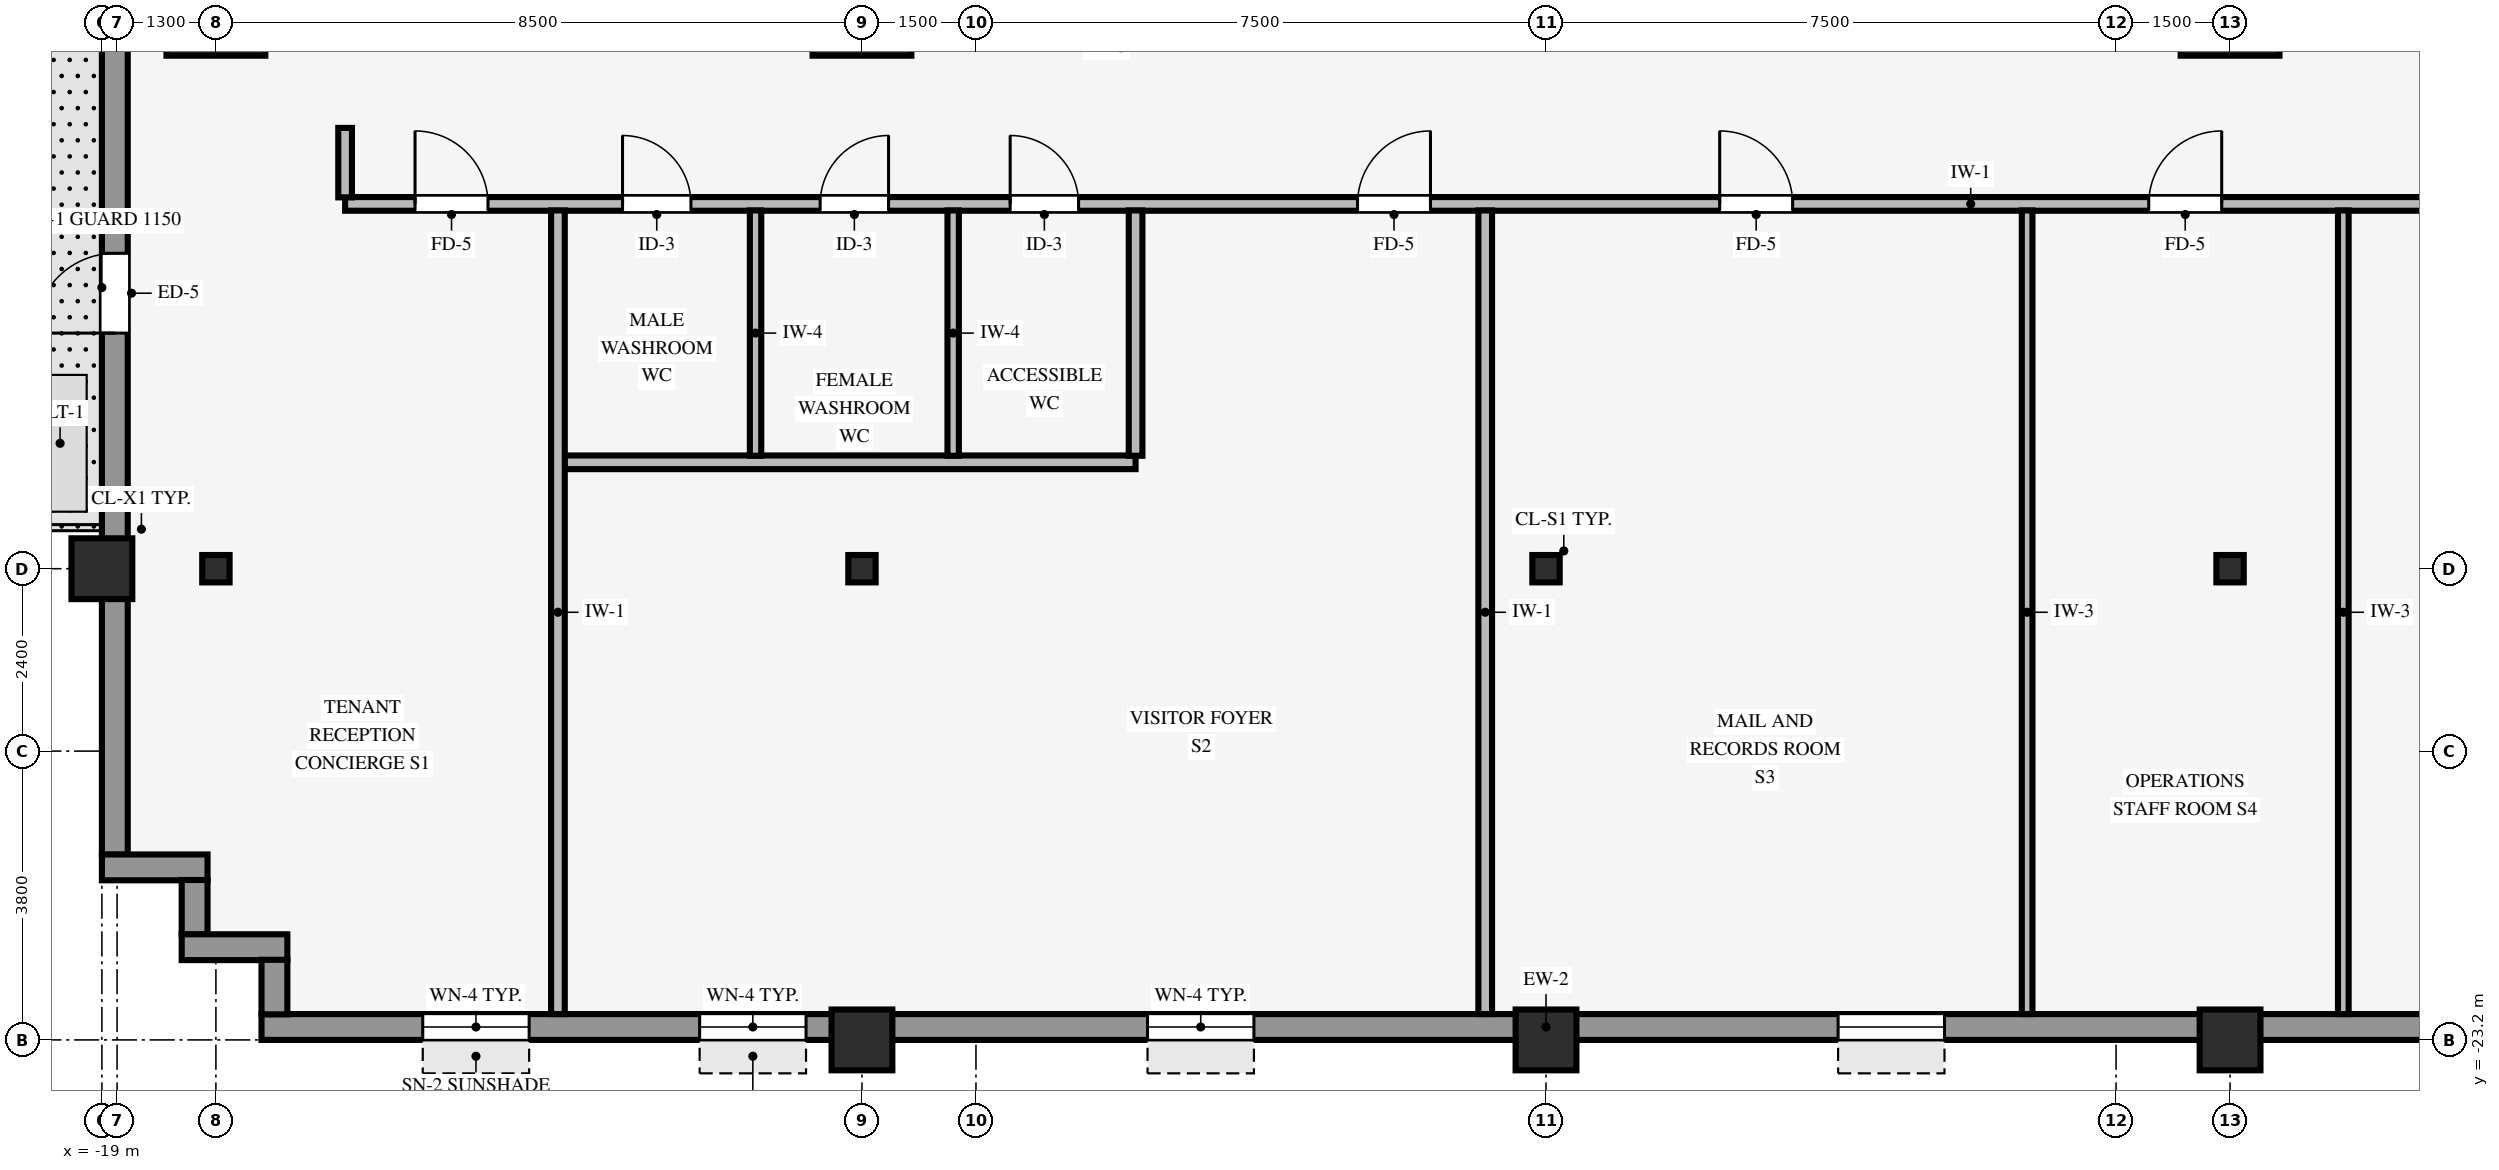
"""IFC4 building model, lengths in metres.
Left out: names, types, materials, properties, quantities, classifications, styles, units other than length and angle.
Written with IfcOpenShell. Run it as: python <this file> out.ifc"""

import sys

from ifc_helpers import new_model, si_unit, direction, frame, frame_2d, origin, origin_2d, place, context, subcontext, project, spatial, rectangle, hollow_rectangle, i_section, extrude, source, transform, mapped, element, fill, save


model = new_model("IFC4")
c1 = context("Model", 3, precision=1e-05, world=origin(), true_north=direction((0.0, 1.0)))
c2 = subcontext(c1, "Body", "Model", "MODEL_VIEW")
j1 = project(units=[si_unit("LENGTHUNIT", "METRE"), si_unit("PLANEANGLEUNIT", "RADIAN")], contexts=[c1])
p1 = place(None, origin())
s1 = spatial("IfcSite", under=j1, at=p1, CompositionType="ELEMENT")
p2 = place(p1, origin())
s2 = spatial("IfcBuilding", under=s1, at=p2, CompositionType="ELEMENT")
p3 = place(p2, frame((0.0, 0.0, 49.5)))
s3 = spatial("IfcBuildingStorey", under=s2, at=p3, CompositionType="ELEMENT", Elevation=49.5)
for number, where, z_axis, x_axis in (
    (1, (-17.5, -9.6, 0.0), (0.0, 0.0, 1.0), (1.0, 0.0, 0.0)),
    (2, (-9.0, -9.6, 0.0), (0.0, 0.0, 1.0), (1.0, 0.0, 0.0)),
    (3, (9.0, -9.6, 0.0), (0.0, 0.0, 1.0), (1.0, 0.0, 0.0)),
):
    element("IfcColumn", number, at=place(p3, frame(where, z_axis=z_axis, x_axis=x_axis)), inside=s3, PredefinedType="COLUMN", context=c2, shape_type="SweptSolid", body=[
        extrude(rectangle(XDim=1.3, YDim=1.3, at=origin_2d()), origin(), (0.0, 0.0, 1.0), 3.37),
    ])
for number, where, z_axis, x_axis in (
    (4, (-19.0, -17.0, 0.0), (0.0, 0.0, 1.0), (1.0, 0.0, 0.0)),
    (5, (-9.0, -23.2, 0.0), (0.0, 0.0, 1.0), (1.0, 0.0, 0.0)),
    (6, (0.0, -23.2, 0.0), (0.0, 0.0, 1.0), (1.0, 0.0, 0.0)),
    (7, (9.0, -23.2, 0.0), (0.0, 0.0, 1.0), (1.0, 0.0, 0.0)),
):
    element("IfcColumn", number, at=place(p3, frame(where, z_axis=z_axis, x_axis=x_axis)), inside=s3, PredefinedType="COLUMN", context=c2, shape_type="SweptSolid", body=[
        extrude(hollow_rectangle(XDim=0.8, YDim=0.8, WallThickness=0.055, InnerFilletRadius=0.055, OuterFilletRadius=0.11, at=origin_2d()), origin(), (0.0, 0.0, 1.0), 3.37),
    ])
for number, where, z_axis, x_axis in (
    (8, (0.0, -17.0, 0.0), (0.0, 0.0, 1.0), (1.0, 0.0, 0.0)),
    (9, (-17.5, -17.0, 0.0), (0.0, 0.0, 1.0), (1.0, 0.0, 0.0)),
    (10, (-9.0, -17.0, 0.0), (0.0, 0.0, 1.0), (1.0, 0.0, 0.0)),
    (11, (9.0, -17.0, 0.0), (0.0, 0.0, 1.0), (1.0, 0.0, 0.0)),
):
    element("IfcColumn", number, at=place(p3, frame(where, z_axis=z_axis, x_axis=x_axis)), inside=s3, PredefinedType="COLUMN", context=c2, shape_type="SweptSolid", body=[
        extrude(i_section(OverallWidth=0.36, OverallDepth=0.36, WebThickness=0.021, FlangeThickness=0.021, FilletRadius=0.018, at=origin_2d()), origin(), (0.0, 0.0, 1.0), 3.37),
    ])
p4 = place(p3, frame((-16.9, -23.03, 0.0), z_axis=(0.0, 0.0, 1.0), x_axis=(1.0, 0.0, 0.0)))
e12 = element("IfcWall", 12, at=p4, inside=s3, PredefinedType="STANDARD", context=c2, shape_type="SweptSolid", body=[
    extrude(rectangle(XDim=33.8, YDim=0.34, at=frame_2d((16.9, 0.0))), origin(), (0.0, 0.0, 1.0), 2.705),
])
p5 = place(p4, frame((2.121, 0.0, 0.8)))
e13 = element("IfcOpeningElement", 13, at=p5, cuts=e12, PredefinedType="OPENING", context=c2, shape_type="SweptSolid", body=[
    extrude(rectangle(XDim=1.4, YDim=1.65, at=frame_2d((0.7, 0.825))), frame((0.0, 0.18, 0.0), z_axis=(0.0, -1.0, 0.0), x_axis=(1.0, 0.0, 0.0)), (0.0, 0.0, 1.0), 0.36),
])
p6 = place(p4, frame((5.764, 0.0, 0.8)))
e14 = element("IfcOpeningElement", 14, at=p6, cuts=e12, PredefinedType="OPENING", context=c2, shape_type="SweptSolid", body=[
    extrude(rectangle(XDim=1.4, YDim=1.65, at=frame_2d((0.7, 0.825))), frame((0.0, 0.18, 0.0), z_axis=(0.0, -1.0, 0.0), x_axis=(1.0, 0.0, 0.0)), (0.0, 0.0, 1.0), 0.36),
])
p7 = place(p4, frame((11.657, 0.0, 0.8)))
e15 = element("IfcOpeningElement", 15, at=p7, cuts=e12, PredefinedType="OPENING", context=c2, shape_type="SweptSolid", body=[
    extrude(rectangle(XDim=1.4, YDim=1.65, at=frame_2d((0.7, 0.825))), frame((0.0, 0.18, 0.0), z_axis=(0.0, -1.0, 0.0), x_axis=(1.0, 0.0, 0.0)), (0.0, 0.0, 1.0), 0.36),
])
p8 = place(p4, frame((20.743, 0.0, 0.8)))
e16 = element("IfcOpeningElement", 16, at=p8, cuts=e12, PredefinedType="OPENING", context=c2, shape_type="SweptSolid", body=[
    extrude(rectangle(XDim=1.4, YDim=1.65, at=frame_2d((0.7, 0.825))), frame((0.0, 0.18, 0.0), z_axis=(0.0, -1.0, 0.0), x_axis=(1.0, 0.0, 0.0)), (0.0, 0.0, 1.0), 0.36),
])
p9 = place(p4, frame((29.829, 0.0, 0.8)))
e17 = element("IfcOpeningElement", 17, at=p9, cuts=e12, PredefinedType="OPENING", context=c2, shape_type="SweptSolid", body=[
    extrude(rectangle(XDim=1.4, YDim=1.65, at=frame_2d((0.7, 0.825))), frame((0.0, 0.18, 0.0), z_axis=(0.0, -1.0, 0.0), x_axis=(1.0, 0.0, 0.0)), (0.0, 0.0, 1.0), 0.36),
])
p10 = place(p3, frame((-18.83, -20.764, 0.0), z_axis=(0.0, 0.0, 1.0), x_axis=(0.0, 1.0, 0.0)))
e18 = element("IfcWall", 18, at=p10, inside=s3, PredefinedType="STANDARD", context=c2, shape_type="SweptSolid", body=[
    extrude(rectangle(XDim=41.528, YDim=0.34, at=frame_2d((20.764, 0.0))), origin(), (0.0, 0.0, 1.0), 2.705),
])
p11 = place(p10, frame((6.864, 0.0, 0.0)))
e19 = element("IfcOpeningElement", 19, at=p11, cuts=e18, PredefinedType="OPENING", context=c2, shape_type="SweptSolid", body=[
    extrude(rectangle(XDim=1.05, YDim=2.1, at=frame_2d((0.525, 1.05))), frame((0.0, 0.18, 0.0), z_axis=(0.0, -1.0, 0.0), x_axis=(1.0, 0.0, 0.0)), (0.0, 0.0, 1.0), 0.36),
])
p12 = place(p10, frame((32.467, 0.0, 0.8)))
e20 = element("IfcOpeningElement", 20, at=p12, cuts=e18, PredefinedType="OPENING", context=c2, shape_type="SweptSolid", body=[
    extrude(rectangle(XDim=2.2, YDim=1.65, at=frame_2d((1.1, 0.825))), frame((0.0, 0.18, 0.0), z_axis=(0.0, -1.0, 0.0), x_axis=(1.0, 0.0, 0.0)), (0.0, 0.0, 1.0), 0.36),
])
p13 = place(p3, frame((-19.0, -20.93, 0.0), z_axis=(0.0, 0.0, 1.0), x_axis=(1.0, 0.0, 0.0)))
e21 = element("IfcWall", 21, at=p13, inside=s3, PredefinedType="STANDARD", context=c2, shape_type="SweptSolid", body=[
    extrude(rectangle(XDim=1.39, YDim=0.34, at=frame_2d((0.695, 0.0))), origin(), (0.0, 0.0, 1.0), 3.36),
])
p14 = place(p3, frame((-17.78, -21.814, 0.0), z_axis=(0.0, 0.0, 1.0), x_axis=(0.0, 1.0, 0.0)))
e22 = element("IfcWall", 22, at=p14, inside=s3, PredefinedType="STANDARD", context=c2, shape_type="SweptSolid", body=[
    extrude(rectangle(XDim=0.718, YDim=0.34, at=frame_2d((0.359, 0.0))), origin(), (0.0, 0.0, 1.0), 3.36),
])
p15 = place(p3, frame((-17.95, -21.98, 0.0), z_axis=(0.0, 0.0, 1.0), x_axis=(1.0, 0.0, 0.0)))
e23 = element("IfcWall", 23, at=p15, inside=s3, PredefinedType="STANDARD", context=c2, shape_type="SweptSolid", body=[
    extrude(rectangle(XDim=1.39, YDim=0.34, at=frame_2d((0.695, 0.0))), origin(), (0.0, 0.0, 1.0), 3.36),
])
p16 = place(p3, frame((-16.73, -22.864, 0.0), z_axis=(0.0, 0.0, 1.0), x_axis=(0.0, 1.0, 0.0)))
e24 = element("IfcWall", 24, at=p16, inside=s3, PredefinedType="STANDARD", context=c2, shape_type="SweptSolid", body=[
    extrude(rectangle(XDim=0.718, YDim=0.34, at=frame_2d((0.359, 0.0))), origin(), (0.0, 0.0, 1.0), 3.36),
])
p17 = place(p3, frame((-12.914, -15.6, 0.0), z_axis=(0.0, 0.0, 1.0), x_axis=(1.0, 0.0, 0.0)))
e25 = element("IfcWall", 25, at=p17, inside=s3, PredefinedType="PARTITIONING", context=c2, shape_type="SweptSolid", body=[
    extrude(rectangle(XDim=7.514, YDim=0.18, at=frame_2d((3.757, 0.0))), origin(), (0.0, 0.0, 1.0), 3.36),
])
p18 = place(p3, frame((-15.8, -12.2, 0.0), z_axis=(0.0, 0.0, 1.0), x_axis=(1.0, 0.0, 0.0)))
e26 = element("IfcWall", 26, at=p18, inside=s3, PredefinedType="PARTITIONING", context=c2, shape_type="SweptSolid", body=[
    extrude(rectangle(XDim=31.6, YDim=0.18, at=frame_2d((15.8, 0.0))), origin(), (0.0, 0.0, 1.0), 3.36),
])
p19 = place(p18, frame((18.085, 0.0, 0.0)))
e27 = element("IfcOpeningElement", 27, at=p19, cuts=e26, PredefinedType="OPENING", context=c2, shape_type="SweptSolid", body=[
    extrude(rectangle(XDim=0.96, YDim=2.1, at=frame_2d((0.48, 1.05))), frame((0.0, 0.1, 0.0), z_axis=(0.0, -1.0, 0.0), x_axis=(1.0, 0.0, 0.0)), (0.0, 0.0, 1.0), 0.2),
])
p20 = place(p18, frame((27.985, 0.0, 0.0)))
e28 = element("IfcOpeningElement", 28, at=p20, cuts=e26, PredefinedType="OPENING", context=c2, shape_type="SweptSolid", body=[
    extrude(rectangle(XDim=0.96, YDim=2.1, at=frame_2d((0.48, 1.05))), frame((0.0, 0.1, 0.0), z_axis=(0.0, -1.0, 0.0), x_axis=(1.0, 0.0, 0.0)), (0.0, 0.0, 1.0), 0.2),
])
p21 = place(p18, frame((23.73, 0.0, 0.0)))
e29 = element("IfcOpeningElement", 29, at=p21, cuts=e26, PredefinedType="OPENING", context=c2, shape_type="SweptSolid", body=[
    extrude(rectangle(XDim=0.96, YDim=2.1, at=frame_2d((0.48, 1.05))), frame((0.0, 0.1, 0.0), z_axis=(0.0, -1.0, 0.0), x_axis=(1.0, 0.0, 0.0)), (0.0, 0.0, 1.0), 0.2),
])
p22 = place(p18, frame((0.92, 0.0, 0.0)))
e30 = element("IfcOpeningElement", 30, at=p22, cuts=e26, PredefinedType="OPENING", context=c2, shape_type="SweptSolid", body=[
    extrude(rectangle(XDim=0.96, YDim=2.1, at=frame_2d((0.48, 1.05))), frame((0.0, 0.1, 0.0), z_axis=(0.0, -1.0, 0.0), x_axis=(1.0, 0.0, 0.0)), (0.0, 0.0, 1.0), 0.2),
])
p23 = place(p18, frame((6.25, 0.0, 0.0)))
e31 = element("IfcOpeningElement", 31, at=p23, cuts=e26, PredefinedType="OPENING", context=c2, shape_type="SweptSolid", body=[
    extrude(rectangle(XDim=0.9, YDim=2.1, at=frame_2d((0.45, 1.05))), frame((0.0, 0.1, 0.0), z_axis=(0.0, -1.0, 0.0), x_axis=(1.0, 0.0, 0.0)), (0.0, 0.0, 1.0), 0.2),
])
p24 = place(p18, frame((3.65, 0.0, 0.0)))
e32 = element("IfcOpeningElement", 32, at=p24, cuts=e26, PredefinedType="OPENING", context=c2, shape_type="SweptSolid", body=[
    extrude(rectangle(XDim=0.9, YDim=2.1, at=frame_2d((0.45, 1.05))), frame((0.0, 0.1, 0.0), z_axis=(0.0, -1.0, 0.0), x_axis=(1.0, 0.0, 0.0)), (0.0, 0.0, 1.0), 0.2),
])
p25 = place(p18, frame((13.32, 0.0, 0.0)))
e33 = element("IfcOpeningElement", 33, at=p25, cuts=e26, PredefinedType="OPENING", context=c2, shape_type="SweptSolid", body=[
    extrude(rectangle(XDim=0.96, YDim=2.1, at=frame_2d((0.48, 1.05))), frame((0.0, 0.1, 0.0), z_axis=(0.0, -1.0, 0.0), x_axis=(1.0, 0.0, 0.0)), (0.0, 0.0, 1.0), 0.2),
])
p26 = place(p18, frame((8.75, 0.0, 0.0)))
e34 = element("IfcOpeningElement", 34, at=p26, cuts=e26, PredefinedType="OPENING", context=c2, shape_type="SweptSolid", body=[
    extrude(rectangle(XDim=0.9, YDim=2.1, at=frame_2d((0.45, 1.05))), frame((0.0, 0.1, 0.0), z_axis=(0.0, -1.0, 0.0), x_axis=(1.0, 0.0, 0.0)), (0.0, 0.0, 1.0), 0.2),
])
p27 = place(p3, frame((-15.8, -12.114, 0.0), z_axis=(0.0, 0.0, 1.0), x_axis=(0.0, 1.0, 0.0)))
e35 = element("IfcWall", 35, at=p27, inside=s3, PredefinedType="PARTITIONING", context=c2, shape_type="SweptSolid", body=[
    extrude(rectangle(XDim=0.914, YDim=0.18, at=frame_2d((0.457, 0.0))), origin(), (0.0, 0.0, 1.0), 3.36),
])
p28 = place(p3, frame((-13.0, -22.86, 0.0), z_axis=(0.0, 0.0, 1.0), x_axis=(0.0, 1.0, 0.0)))
e36 = element("IfcWall", 36, at=p28, inside=s3, PredefinedType="PARTITIONING", context=c2, shape_type="SweptSolid", body=[
    extrude(rectangle(XDim=10.574, YDim=0.18, at=frame_2d((5.287, 0.0))), origin(), (0.0, 0.0, 1.0), 3.36),
])
for number, where, z_axis, x_axis in (
    (37, (-10.4, -15.514, 0.0), (0.0, 0.0, 1.0), (0.0, 1.0, 0.0)),
    (38, (-7.8, -15.514, 0.0), (0.0, 0.0, 1.0), (0.0, 1.0, 0.0)),
):
    element("IfcWall", number, at=place(p3, frame(where, z_axis=z_axis, x_axis=x_axis)), inside=s3, PredefinedType="PARTITIONING", context=c2, shape_type="SweptSolid", body=[
        extrude(rectangle(XDim=3.228, YDim=0.15, at=frame_2d((1.614, 0.0))), origin(), (0.0, 0.0, 1.0), 3.36),
    ])
p29 = place(p3, frame((-5.4, -15.514, 0.0), z_axis=(0.0, 0.0, 1.0), x_axis=(0.0, 1.0, 0.0)))
e39 = element("IfcWall", 39, at=p29, inside=s3, PredefinedType="PARTITIONING", context=c2, shape_type="SweptSolid", body=[
    extrude(rectangle(XDim=3.228, YDim=0.18, at=frame_2d((1.614, 0.0))), origin(), (0.0, 0.0, 1.0), 3.36),
])
p30 = place(p3, frame((-0.8, -22.86, 0.0), z_axis=(0.0, 0.0, 1.0), x_axis=(0.0, 1.0, 0.0)))
e40 = element("IfcWall", 40, at=p30, inside=s3, PredefinedType="PARTITIONING", context=c2, shape_type="SweptSolid", body=[
    extrude(rectangle(XDim=10.574, YDim=0.18, at=frame_2d((5.287, 0.0))), origin(), (0.0, 0.0, 1.0), 3.36),
])
for number, where, z_axis, x_axis in (
    (41, (6.33, -22.86, 0.0), (0.0, 0.0, 1.0), (0.0, 1.0, 0.0)),
    (42, (10.49, -22.86, 0.0), (0.0, 0.0, 1.0), (0.0, 1.0, 0.0)),
):
    element("IfcWall", number, at=place(p3, frame(where, z_axis=z_axis, x_axis=x_axis)), inside=s3, PredefinedType="PARTITIONING", context=c2, shape_type="SweptSolid", body=[
        extrude(rectangle(XDim=10.574, YDim=0.14, at=frame_2d((5.287, 0.0))), origin(), (0.0, 0.0, 1.0), 3.36),
    ])
m1 = source(origin(), c2, "Body", "SweptSolid", [
    extrude(rectangle(XDim=1.4, YDim=1.65, at=frame_2d((0.7, 0.825))), frame((0.0, 0.03, 0.0), z_axis=(0.0, -1.0, 0.0), x_axis=(1.0, 0.0, 0.0)), (0.0, 0.0, 1.0), 0.06),
])
p31 = place(p5, origin())
e43 = element("IfcWindow", 43, at=p31, inside=s3, PartitioningType="SINGLE_PANEL", PredefinedType="WINDOW", context=c2, shape_type="MappedRepresentation", body=[
    mapped(m1, transform((0.0, 0.0, 0.0), scale=1.0)),
])
fill(e13, e43)
p32 = place(p6, origin())
e44 = element("IfcWindow", 44, at=p32, inside=s3, PartitioningType="SINGLE_PANEL", PredefinedType="WINDOW", context=c2, shape_type="MappedRepresentation", body=[
    mapped(m1, transform((0.0, 0.0, 0.0), scale=1.0)),
])
fill(e14, e44)
p33 = place(p7, origin())
e45 = element("IfcWindow", 45, at=p33, inside=s3, PartitioningType="SINGLE_PANEL", PredefinedType="WINDOW", context=c2, shape_type="MappedRepresentation", body=[
    mapped(m1, transform((0.0, 0.0, 0.0), scale=1.0)),
])
fill(e15, e45)
p34 = place(p8, origin())
e46 = element("IfcWindow", 46, at=p34, inside=s3, PartitioningType="SINGLE_PANEL", PredefinedType="WINDOW", context=c2, shape_type="MappedRepresentation", body=[
    mapped(m1, transform((0.0, 0.0, 0.0), scale=1.0)),
])
fill(e16, e46)
m2 = source(origin(), c2, "Body", "SweptSolid", [
    extrude(rectangle(XDim=1.05, YDim=2.1, at=frame_2d((0.525, 1.05))), frame((0.0, 0.025, 0.0), z_axis=(0.0, -1.0, 0.0), x_axis=(1.0, 0.0, 0.0)), (0.0, 0.0, 1.0), 0.05),
])
p35 = place(p11, origin())
e47 = element("IfcDoor", 47, at=p35, inside=s3, OperationType="SINGLE_SWING_LEFT", PredefinedType="DOOR", context=c2, shape_type="MappedRepresentation", body=[
    mapped(m2, transform((0.0, 0.0, 0.0), scale=1.0)),
])
fill(e19, e47)
m3 = source(origin(), c2, "Body", "SweptSolid", [
    extrude(rectangle(XDim=0.96, YDim=2.1, at=frame_2d((0.48, 1.05))), frame((0.0, 0.025, 0.0), z_axis=(0.0, -1.0, 0.0), x_axis=(1.0, 0.0, 0.0)), (0.0, 0.0, 1.0), 0.05),
])
p36 = place(p19, origin())
e48 = element("IfcDoor", 48, at=p36, inside=s3, OperationType="SINGLE_SWING_LEFT", PredefinedType="DOOR", context=c2, shape_type="MappedRepresentation", body=[
    mapped(m3, transform((0.0, 0.0, 0.0), scale=1.0)),
])
fill(e27, e48)
p37 = place(p21, origin())
e49 = element("IfcDoor", 49, at=p37, inside=s3, OperationType="SINGLE_SWING_RIGHT", PredefinedType="DOOR", context=c2, shape_type="MappedRepresentation", body=[
    mapped(m3, transform((0.0, 0.0, 0.0), scale=1.0)),
])
fill(e29, e49)
p38 = place(p22, origin())
e50 = element("IfcDoor", 50, at=p38, inside=s3, OperationType="SINGLE_SWING_LEFT", PredefinedType="DOOR", context=c2, shape_type="MappedRepresentation", body=[
    mapped(m3, transform((0.0, 0.0, 0.0), scale=1.0)),
])
fill(e30, e50)
m4 = source(origin(), c2, "Body", "SweptSolid", [
    extrude(rectangle(XDim=0.9, YDim=2.1, at=frame_2d((0.45, 1.05))), frame((0.0, 0.025, 0.0), z_axis=(0.0, -1.0, 0.0), x_axis=(1.0, 0.0, 0.0)), (0.0, 0.0, 1.0), 0.05),
])
p39 = place(p23, origin())
e51 = element("IfcDoor", 51, at=p39, inside=s3, OperationType="SINGLE_SWING_RIGHT", PredefinedType="DOOR", context=c2, shape_type="MappedRepresentation", body=[
    mapped(m4, transform((0.0, 0.0, 0.0), scale=1.0)),
])
fill(e31, e51)
p40 = place(p24, origin())
e52 = element("IfcDoor", 52, at=p40, inside=s3, OperationType="SINGLE_SWING_LEFT", PredefinedType="DOOR", context=c2, shape_type="MappedRepresentation", body=[
    mapped(m4, transform((0.0, 0.0, 0.0), scale=1.0)),
])
fill(e32, e52)
p41 = place(p25, origin())
e53 = element("IfcDoor", 53, at=p41, inside=s3, OperationType="SINGLE_SWING_RIGHT", PredefinedType="DOOR", context=c2, shape_type="MappedRepresentation", body=[
    mapped(m3, transform((0.0, 0.0, 0.0), scale=1.0)),
])
fill(e33, e53)
p42 = place(p26, origin())
e54 = element("IfcDoor", 54, at=p42, inside=s3, OperationType="SINGLE_SWING_LEFT", PredefinedType="DOOR", context=c2, shape_type="MappedRepresentation", body=[
    mapped(m4, transform((0.0, 0.0, 0.0), scale=1.0)),
])
fill(e34, e54)
save(model, sys.argv[1])
